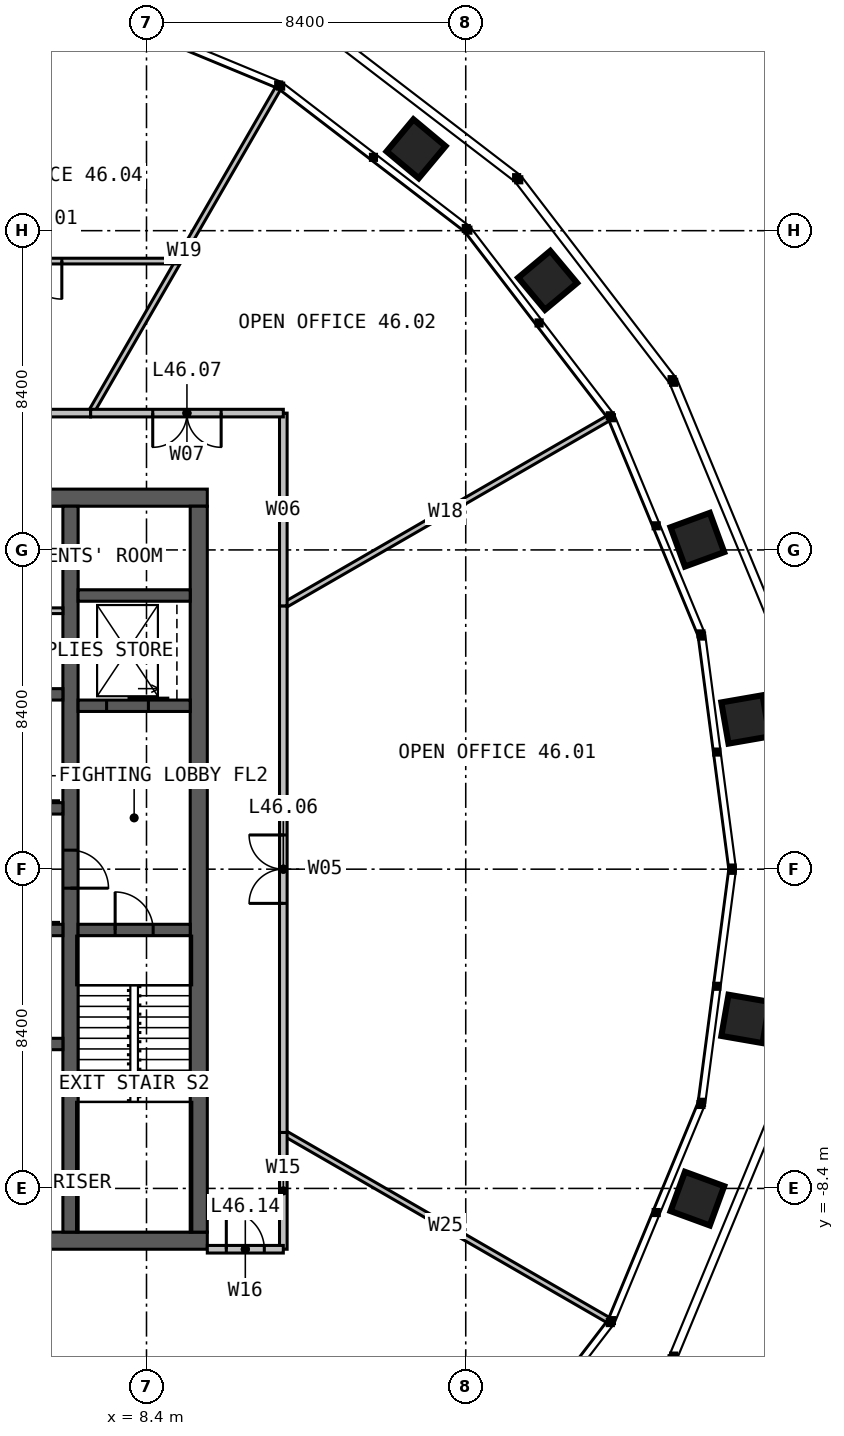
"""IFC4 building model, lengths in metres.
Left out: names, types, materials, properties, quantities, classifications, styles, units other than length and angle.
Written with IfcOpenShell. Run it as: python <this file> out.ifc"""

import sys

from ifc_helpers import new_model, si_unit, direction, frame, frame_2d, origin, place, context, subcontext, project, spatial, rectangle, extrude, element, fill, save


model = new_model("IFC4")
c1 = context("Model", 3, precision=1e-05, world=origin(), true_north=direction((0.0, 1.0)))
c2 = subcontext(c1, "Body", "Model", "MODEL_VIEW")
j1 = project(units=[si_unit("LENGTHUNIT", "METRE"), si_unit("PLANEANGLEUNIT", "RADIAN")], contexts=[c1])
p1 = place(None, origin())
s1 = spatial("IfcSite", under=j1, at=p1, CompositionType="ELEMENT")
p2 = place(p1, origin())
s2 = spatial("IfcBuilding", under=s1, at=p2, CompositionType="ELEMENT")
p3 = place(p2, frame((0.0, 0.0, 191.0)))
s3 = spatial("IfcBuildingStorey", under=s2, at=p3, CompositionType="ELEMENT", Elevation=191.0)
p4 = place(p3, frame((-10.0, 9.775, 0.0), z_axis=(0.0, 0.0, 1.0), x_axis=(1.0, 0.0, 0.0)))
e1 = element("IfcWall", 1, at=p4, inside=s3, PredefinedType="SOLIDWALL", context=c2, shape_type="SweptSolid", body=[
    extrude(rectangle(XDim=20.0, YDim=0.45, at=frame_2d((10.0, 0.0))), origin(), (0.0, 0.0, 1.0), 4.0),
])
p5 = place(p4, frame((9.4, 0.0, 0.0)))
e2 = element("IfcOpeningElement", 2, at=p5, cuts=e1, PredefinedType="OPENING", context=c2, shape_type="SweptSolid", body=[
    extrude(rectangle(XDim=1.2, YDim=2.2, at=frame_2d((0.6, 1.1))), frame((0.0, 0.235, 0.0), z_axis=(0.0, -1.0, 0.0), x_axis=(1.0, 0.0, 0.0)), (0.0, 0.0, 1.0), 0.47),
])
p6 = place(p3, frame((10.0, -9.775, 0.0), z_axis=(0.0, 0.0, 1.0), x_axis=(-1.0, 0.0, 0.0)))
e3 = element("IfcWall", 3, at=p6, inside=s3, PredefinedType="SOLIDWALL", context=c2, shape_type="SweptSolid", body=[
    extrude(rectangle(XDim=20.0, YDim=0.45, at=frame_2d((10.0, 0.0))), origin(), (0.0, 0.0, 1.0), 4.0),
])
p7 = place(p6, frame((6.875, 0.0, 0.0)))
e4 = element("IfcOpeningElement", 4, at=p7, cuts=e3, PredefinedType="OPENING", context=c2, shape_type="SweptSolid", body=[
    extrude(rectangle(XDim=1.2, YDim=2.2, at=frame_2d((0.6, 1.1))), frame((0.0, 0.235, 0.0), z_axis=(0.0, -1.0, 0.0), x_axis=(1.0, 0.0, 0.0)), (0.0, 0.0, 1.0), 0.47),
])
p8 = place(p3, frame((9.775, -9.55, 0.0), z_axis=(0.0, 0.0, 1.0), x_axis=(0.0, 1.0, 0.0)))
e5 = element("IfcWall", 5, at=p8, inside=s3, PredefinedType="SOLIDWALL", context=c2, shape_type="SweptSolid", body=[
    extrude(rectangle(XDim=19.1, YDim=0.45, at=frame_2d((9.55, 0.0))), origin(), (0.0, 0.0, 1.0), 4.0),
])
p9 = place(p3, frame((6.4, 9.55, 0.0), z_axis=(0.0, 0.0, 1.0), x_axis=(0.0, -1.0, 0.0)))
e6 = element("IfcWall", 6, at=p9, inside=s3, PredefinedType="SOLIDWALL", context=c2, shape_type="SweptSolid", body=[
    extrude(rectangle(XDim=19.1, YDim=0.4, at=frame_2d((9.55, 0.0))), origin(), (0.0, 0.0, 1.0), 4.0),
])
p10 = place(p9, frame((9.05, 0.0, 0.0)))
e7 = element("IfcOpeningElement", 7, at=p10, cuts=e6, PredefinedType="OPENING", context=c2, shape_type="SweptSolid", body=[
    extrude(rectangle(XDim=1.0, YDim=2.2, at=frame_2d((0.5, 1.1))), frame((0.0, 0.21, 0.0), z_axis=(0.0, -1.0, 0.0), x_axis=(1.0, 0.0, 0.0)), (0.0, 0.0, 1.0), 0.42),
])
p11 = place(p3, frame((1.35, 1.6, 0.0), z_axis=(0.0, 0.0, 1.0), x_axis=(1.0, 0.0, 0.0)))
e8 = element("IfcWall", 8, at=p11, inside=s3, PredefinedType="SOLIDWALL", context=c2, shape_type="SweptSolid", body=[
    extrude(rectangle(XDim=4.85, YDim=0.3, at=frame_2d((2.425, 0.0))), origin(), (0.0, 0.0, 1.0), 4.0),
])
p12 = place(p11, frame((0.6, 0.0, 0.0)))
e9 = element("IfcOpeningElement", 9, at=p12, cuts=e8, PredefinedType="OPENING", context=c2, shape_type="SweptSolid", body=[
    extrude(rectangle(XDim=1.1, YDim=2.2, at=frame_2d((0.55, 1.1))), frame((0.0, 0.16, 0.0), z_axis=(0.0, -1.0, 0.0), x_axis=(1.0, 0.0, 0.0)), (0.0, 0.0, 1.0), 0.32),
])
p13 = place(p11, frame((3.125, 0.0, 0.0)))
e10 = element("IfcOpeningElement", 10, at=p13, cuts=e8, PredefinedType="OPENING", context=c2, shape_type="SweptSolid", body=[
    extrude(rectangle(XDim=1.1, YDim=2.2, at=frame_2d((0.55, 1.1))), frame((0.0, 0.16, 0.0), z_axis=(0.0, -1.0, 0.0), x_axis=(1.0, 0.0, 0.0)), (0.0, 0.0, 1.0), 0.32),
])
p14 = place(p3, frame((1.35, 4.6, 0.0), z_axis=(0.0, 0.0, 1.0), x_axis=(1.0, 0.0, 0.0)))
e11 = element("IfcWall", 11, at=p14, inside=s3, PredefinedType="SOLIDWALL", context=c2, shape_type="SweptSolid", body=[
    extrude(rectangle(XDim=4.85, YDim=0.3, at=frame_2d((2.425, 0.0))), origin(), (0.0, 0.0, 1.0), 4.0),
])
p15 = place(p3, frame((3.85, -1.6, 0.0), z_axis=(0.0, 0.0, 1.0), x_axis=(1.0, 0.0, 0.0)))
e12 = element("IfcWall", 12, at=p15, inside=s3, PredefinedType="SOLIDWALL", context=c2, shape_type="SweptSolid", body=[
    extrude(rectangle(XDim=2.35, YDim=0.3, at=frame_2d((1.175, 0.0))), origin(), (0.0, 0.0, 1.0), 4.0),
])
p16 = place(p15, frame((0.625, 0.0, 0.0)))
e13 = element("IfcOpeningElement", 13, at=p16, cuts=e12, PredefinedType="OPENING", context=c2, shape_type="SweptSolid", body=[
    extrude(rectangle(XDim=1.1, YDim=2.2, at=frame_2d((0.55, 1.1))), frame((0.0, 0.16, 0.0), z_axis=(0.0, -1.0, 0.0), x_axis=(1.0, 0.0, 0.0)), (0.0, 0.0, 1.0), 0.32),
])
p17 = place(p3, frame((3.85, -4.6, 0.0), z_axis=(0.0, 0.0, 1.0), x_axis=(1.0, 0.0, 0.0)))
e14 = element("IfcWall", 14, at=p17, inside=s3, PredefinedType="SOLIDWALL", context=c2, shape_type="SweptSolid", body=[
    extrude(rectangle(XDim=2.35, YDim=0.3, at=frame_2d((1.175, 0.0))), origin(), (0.0, 0.0, 1.0), 4.0),
])
p18 = place(p3, frame((6.6, -1.6, 0.0), z_axis=(0.0, 0.0, 1.0), x_axis=(1.0, 0.0, 0.0)))
e15 = element("IfcWall", 15, at=p18, inside=s3, PredefinedType="SOLIDWALL", context=c2, shape_type="SweptSolid", body=[
    extrude(rectangle(XDim=2.95, YDim=0.3, at=frame_2d((1.475, 0.0))), origin(), (0.0, 0.0, 1.0), 4.0),
])
p19 = place(p18, frame((0.975, 0.0, 0.0)))
e16 = element("IfcOpeningElement", 16, at=p19, cuts=e15, PredefinedType="OPENING", context=c2, shape_type="SweptSolid", body=[
    extrude(rectangle(XDim=1.0, YDim=2.2, at=frame_2d((0.5, 1.1))), frame((0.0, 0.16, 0.0), z_axis=(0.0, -1.0, 0.0), x_axis=(1.0, 0.0, 0.0)), (0.0, 0.0, 1.0), 0.32),
])
p20 = place(p3, frame((6.6, 4.3, 0.0), z_axis=(0.0, 0.0, 1.0), x_axis=(1.0, 0.0, 0.0)))
e17 = element("IfcWall", 17, at=p20, inside=s3, PredefinedType="SOLIDWALL", context=c2, shape_type="SweptSolid", body=[
    extrude(rectangle(XDim=2.95, YDim=0.3, at=frame_2d((1.475, 0.0))), origin(), (0.0, 0.0, 1.0), 4.0),
])
p21 = place(p20, frame((0.75, 0.0, 0.0)))
e18 = element("IfcOpeningElement", 18, at=p21, cuts=e17, PredefinedType="OPENING", context=c2, shape_type="SweptSolid", body=[
    extrude(rectangle(XDim=1.1, YDim=2.2, at=frame_2d((0.55, 1.1))), frame((0.0, 0.16, 0.0), z_axis=(0.0, -1.0, 0.0), x_axis=(1.0, 0.0, 0.0)), (0.0, 0.0, 1.0), 0.32),
])
p22 = place(p3, frame((6.6, 7.2, 0.0), z_axis=(0.0, 0.0, 1.0), x_axis=(1.0, 0.0, 0.0)))
e19 = element("IfcWall", 19, at=p22, inside=s3, PredefinedType="SOLIDWALL", context=c2, shape_type="SweptSolid", body=[
    extrude(rectangle(XDim=2.95, YDim=0.3, at=frame_2d((1.475, 0.0))), origin(), (0.0, 0.0, 1.0), 4.0),
])
p23 = place(p3, frame((1.35, 6.8, 0.0), z_axis=(0.0, 0.0, 1.0), x_axis=(1.0, 0.0, 0.0)))
e20 = element("IfcWall", 20, at=p23, inside=s3, PredefinedType="PARTITIONING", context=c2, shape_type="SweptSolid", body=[
    extrude(rectangle(XDim=4.85, YDim=0.15, at=frame_2d((2.425, 0.0))), origin(), (0.0, 0.0, 1.0), 3.75),
])
p24 = place(p23, frame((3.15, 0.0, 0.0)))
e21 = element("IfcOpeningElement", 21, at=p24, cuts=e20, PredefinedType="OPENING", context=c2, shape_type="SweptSolid", body=[
    extrude(rectangle(XDim=0.9, YDim=2.2, at=frame_2d((0.45, 1.1))), frame((0.0, 0.085, 0.0), z_axis=(0.0, -1.0, 0.0), x_axis=(1.0, 0.0, 0.0)), (0.0, 0.0, 1.0), 0.17),
])
for number, where, z_axis, x_axis in (
    (22, (12.0, -6.928, 0.0), (0.0, 0.0, 1.0), (0.866, -0.5, 0.0)),
    (23, (12.0, 6.928, 0.0), (0.0, 0.0, 1.0), (0.866, 0.5, 0.0)),
    (24, (6.928, 12.0, 0.0), (0.0, 0.0, 1.0), (0.5, 0.866, 0.0)),
):
    element("IfcWall", number, at=place(p3, frame(where, z_axis=z_axis, x_axis=x_axis)), inside=s3, PredefinedType="PARTITIONING", context=c2, shape_type="SweptSolid", body=[
        extrude(rectangle(XDim=9.865, YDim=0.15, at=frame_2d((4.932, 0.0))), origin(), (0.0, 0.0, 1.0), 2.79),
    ])
p25 = place(p3, frame((12.0, -6.928, 0.0), z_axis=(0.0, 0.0, 1.0), x_axis=(0.0, 1.0, 0.0)))
e25 = element("IfcWall", 25, at=p25, inside=s3, PredefinedType="PARTITIONING", context=c2, shape_type="SweptSolid", body=[
    extrude(rectangle(XDim=13.856, YDim=0.2, at=frame_2d((6.928, 0.0))), origin(), (0.0, 0.0, 1.0), 3.8),
])
p26 = place(p25, frame((6.028, 0.0, 0.0)))
e26 = element("IfcOpeningElement", 26, at=p26, cuts=e25, PredefinedType="OPENING", context=c2, shape_type="SweptSolid", body=[
    extrude(rectangle(XDim=1.8, YDim=2.2, at=frame_2d((0.9, 1.1))), frame((0.0, 0.11, 0.0), z_axis=(0.0, -1.0, 0.0), x_axis=(1.0, 0.0, 0.0)), (0.0, 0.0, 1.0), 0.22),
])
p27 = place(p3, frame((12.0, 6.928, 0.0), z_axis=(0.0, 0.0, 1.0), x_axis=(0.0, 1.0, 0.0)))
e27 = element("IfcWall", 27, at=p27, inside=s3, PredefinedType="PARTITIONING", context=c2, shape_type="SweptSolid", body=[
    extrude(rectangle(XDim=5.072, YDim=0.2, at=frame_2d((2.536, 0.0))), origin(), (0.0, 0.0, 1.0), 3.8),
])
p28 = place(p3, frame((12.0, 12.0, 0.0), z_axis=(0.0, 0.0, 1.0), x_axis=(-1.0, 0.0, 0.0)))
e28 = element("IfcWall", 28, at=p28, inside=s3, PredefinedType="PARTITIONING", context=c2, shape_type="SweptSolid", body=[
    extrude(rectangle(XDim=5.072, YDim=0.2, at=frame_2d((2.536, 0.0))), origin(), (0.0, 0.0, 1.0), 3.8),
])
p29 = place(p28, frame((1.636, 0.0, 0.0)))
e29 = element("IfcOpeningElement", 29, at=p29, cuts=e28, PredefinedType="OPENING", context=c2, shape_type="SweptSolid", body=[
    extrude(rectangle(XDim=1.8, YDim=2.2, at=frame_2d((0.9, 1.1))), frame((0.0, 0.11, 0.0), z_axis=(0.0, -1.0, 0.0), x_axis=(1.0, 0.0, 0.0)), (0.0, 0.0, 1.0), 0.22),
])
p30 = place(p3, frame((9.238, 16.0, 0.0), z_axis=(0.0, 0.0, 1.0), x_axis=(-1.0, 0.0, 0.0)))
e30 = element("IfcWall", 30, at=p30, inside=s3, PredefinedType="PARTITIONING", context=c2, shape_type="SweptSolid", body=[
    extrude(rectangle(XDim=18.475, YDim=0.15, at=frame_2d((9.238, 0.0))), origin(), (0.0, 0.0, 1.0), 2.79),
])
p31 = place(p30, frame((3.066, 0.0, 0.0)))
e31 = element("IfcOpeningElement", 31, at=p31, cuts=e30, PredefinedType="OPENING", context=c2, shape_type="SweptSolid", body=[
    extrude(rectangle(XDim=1.0, YDim=2.2, at=frame_2d((0.5, 1.1))), frame((0.0, 0.085, 0.0), z_axis=(0.0, -1.0, 0.0), x_axis=(1.0, 0.0, 0.0)), (0.0, 0.0, 1.0), 0.17),
])
p32 = place(p30, frame((7.684, 0.0, 0.0)))
e32 = element("IfcOpeningElement", 32, at=p32, cuts=e30, PredefinedType="OPENING", context=c2, shape_type="SweptSolid", body=[
    extrude(rectangle(XDim=1.0, YDim=2.2, at=frame_2d((0.5, 1.1))), frame((0.0, 0.085, 0.0), z_axis=(0.0, -1.0, 0.0), x_axis=(1.0, 0.0, 0.0)), (0.0, 0.0, 1.0), 0.17),
])
p33 = place(p30, frame((10.881, 0.0, 0.0)))
e33 = element("IfcOpeningElement", 33, at=p33, cuts=e30, PredefinedType="OPENING", context=c2, shape_type="SweptSolid", body=[
    extrude(rectangle(XDim=1.0, YDim=2.2, at=frame_2d((0.5, 1.1))), frame((0.0, 0.085, 0.0), z_axis=(0.0, -1.0, 0.0), x_axis=(1.0, 0.0, 0.0)), (0.0, 0.0, 1.0), 0.17),
])
p34 = place(p30, frame((15.5, 0.0, 0.0)))
e34 = element("IfcOpeningElement", 34, at=p34, cuts=e30, PredefinedType="OPENING", context=c2, shape_type="SweptSolid", body=[
    extrude(rectangle(XDim=1.0, YDim=2.2, at=frame_2d((0.5, 1.1))), frame((0.0, 0.085, 0.0), z_axis=(0.0, -1.0, 0.0), x_axis=(1.0, 0.0, 0.0)), (0.0, 0.0, 1.0), 0.17),
])
p35 = place(p3, frame((6.928, 12.0, 0.0), z_axis=(0.0, 0.0, 1.0), x_axis=(-1.0, 0.0, 0.0)))
e35 = element("IfcWall", 35, at=p35, inside=s3, PredefinedType="PARTITIONING", context=c2, shape_type="SweptSolid", body=[
    extrude(rectangle(XDim=13.856, YDim=0.2, at=frame_2d((6.928, 0.0))), origin(), (0.0, 0.0, 1.0), 3.8),
])
p36 = place(p35, frame((6.028, 0.0, 0.0)))
e36 = element("IfcOpeningElement", 36, at=p36, cuts=e35, PredefinedType="OPENING", context=c2, shape_type="SweptSolid", body=[
    extrude(rectangle(XDim=1.8, YDim=2.2, at=frame_2d((0.9, 1.1))), frame((0.0, 0.11, 0.0), z_axis=(0.0, -1.0, 0.0), x_axis=(1.0, 0.0, 0.0)), (0.0, 0.0, 1.0), 0.22),
])
p37 = place(p3, frame((12.0, -10.0, 0.0), z_axis=(0.0, 0.0, 1.0), x_axis=(0.0, 1.0, 0.0)))
e37 = element("IfcWall", 37, at=p37, inside=s3, PredefinedType="PARTITIONING", context=c2, shape_type="SweptSolid", body=[
    extrude(rectangle(XDim=3.072, YDim=0.2, at=frame_2d((1.536, 0.0))), origin(), (0.0, 0.0, 1.0), 3.8),
])
p38 = place(p3, frame((10.0, -10.0, 0.0), z_axis=(0.0, 0.0, 1.0), x_axis=(1.0, 0.0, 0.0)))
e38 = element("IfcWall", 38, at=p38, inside=s3, PredefinedType="PARTITIONING", context=c2, shape_type="SweptSolid", body=[
    extrude(rectangle(XDim=2.0, YDim=0.2, at=frame_2d((1.0, 0.0))), origin(), (0.0, 0.0, 1.0), 3.8),
])
p39 = place(p38, frame((0.5, 0.0, 0.0)))
e39 = element("IfcOpeningElement", 39, at=p39, cuts=e38, PredefinedType="OPENING", context=c2, shape_type="SweptSolid", body=[
    extrude(rectangle(XDim=1.0, YDim=2.2, at=frame_2d((0.5, 1.1))), frame((0.0, 0.11, 0.0), z_axis=(0.0, -1.0, 0.0), x_axis=(1.0, 0.0, 0.0)), (0.0, 0.0, 1.0), 0.22),
])
p40 = place(p10, origin())
e40 = element("IfcDoor", 40, at=p40, inside=s3, OperationType="SINGLE_SWING_RIGHT", PredefinedType="DOOR", context=c2, shape_type="SweptSolid", body=[
    extrude(rectangle(XDim=1.0, YDim=2.2, at=frame_2d((0.5, 1.1))), frame((0.0, 0.025, 0.0), z_axis=(0.0, -1.0, 0.0), x_axis=(1.0, 0.0, 0.0)), (0.0, 0.0, 1.0), 0.05),
])
fill(e7, e40)
p41 = place(p19, origin())
e41 = element("IfcDoor", 41, at=p41, inside=s3, OperationType="SINGLE_SWING_LEFT", PredefinedType="DOOR", context=c2, shape_type="SweptSolid", body=[
    extrude(rectangle(XDim=1.0, YDim=2.2, at=frame_2d((0.5, 1.1))), frame((0.0, 0.025, 0.0), z_axis=(0.0, -1.0, 0.0), x_axis=(1.0, 0.0, 0.0)), (0.0, 0.0, 1.0), 0.05),
])
fill(e16, e41)
p42 = place(p21, origin())
e42 = element("IfcDoor", 42, at=p42, inside=s3, OperationType="SLIDING_TO_LEFT", PredefinedType="DOOR", context=c2, shape_type="SweptSolid", body=[
    extrude(rectangle(XDim=1.1, YDim=2.2, at=frame_2d((0.55, 1.1))), frame((0.0, 0.025, 0.0), z_axis=(0.0, -1.0, 0.0), x_axis=(1.0, 0.0, 0.0)), (0.0, 0.0, 1.0), 0.05),
])
fill(e18, e42)
p43 = place(p26, origin())
e43 = element("IfcDoor", 43, at=p43, inside=s3, OperationType="DOUBLE_DOOR_SINGLE_SWING", PredefinedType="DOOR", context=c2, shape_type="SweptSolid", body=[
    extrude(rectangle(XDim=1.8, YDim=2.2, at=frame_2d((0.9, 1.1))), frame((0.0, 0.025, 0.0), z_axis=(0.0, -1.0, 0.0), x_axis=(1.0, 0.0, 0.0)), (0.0, 0.0, 1.0), 0.05),
])
fill(e26, e43)
p44 = place(p29, origin())
e44 = element("IfcDoor", 44, at=p44, inside=s3, OperationType="DOUBLE_DOOR_SINGLE_SWING", PredefinedType="DOOR", context=c2, shape_type="SweptSolid", body=[
    extrude(rectangle(XDim=1.8, YDim=2.2, at=frame_2d((0.9, 1.1))), frame((0.0, 0.025, 0.0), z_axis=(0.0, -1.0, 0.0), x_axis=(1.0, 0.0, 0.0)), (0.0, 0.0, 1.0), 0.05),
])
fill(e29, e44)
p45 = place(p31, origin())
e45 = element("IfcDoor", 45, at=p45, inside=s3, OperationType="SINGLE_SWING_LEFT", PredefinedType="DOOR", context=c2, shape_type="SweptSolid", body=[
    extrude(rectangle(XDim=1.0, YDim=2.2, at=frame_2d((0.5, 1.1))), frame((0.0, 0.025, 0.0), z_axis=(0.0, -1.0, 0.0), x_axis=(1.0, 0.0, 0.0)), (0.0, 0.0, 1.0), 0.05),
])
fill(e31, e45)
p46 = place(p39, origin())
e46 = element("IfcDoor", 46, at=p46, inside=s3, OperationType="SINGLE_SWING_LEFT", PredefinedType="DOOR", context=c2, shape_type="SweptSolid", body=[
    extrude(rectangle(XDim=1.0, YDim=2.2, at=frame_2d((0.5, 1.1))), frame((0.0, 0.025, 0.0), z_axis=(0.0, -1.0, 0.0), x_axis=(1.0, 0.0, 0.0)), (0.0, 0.0, 1.0), 0.05),
])
fill(e39, e46)
save(model, sys.argv[1])
